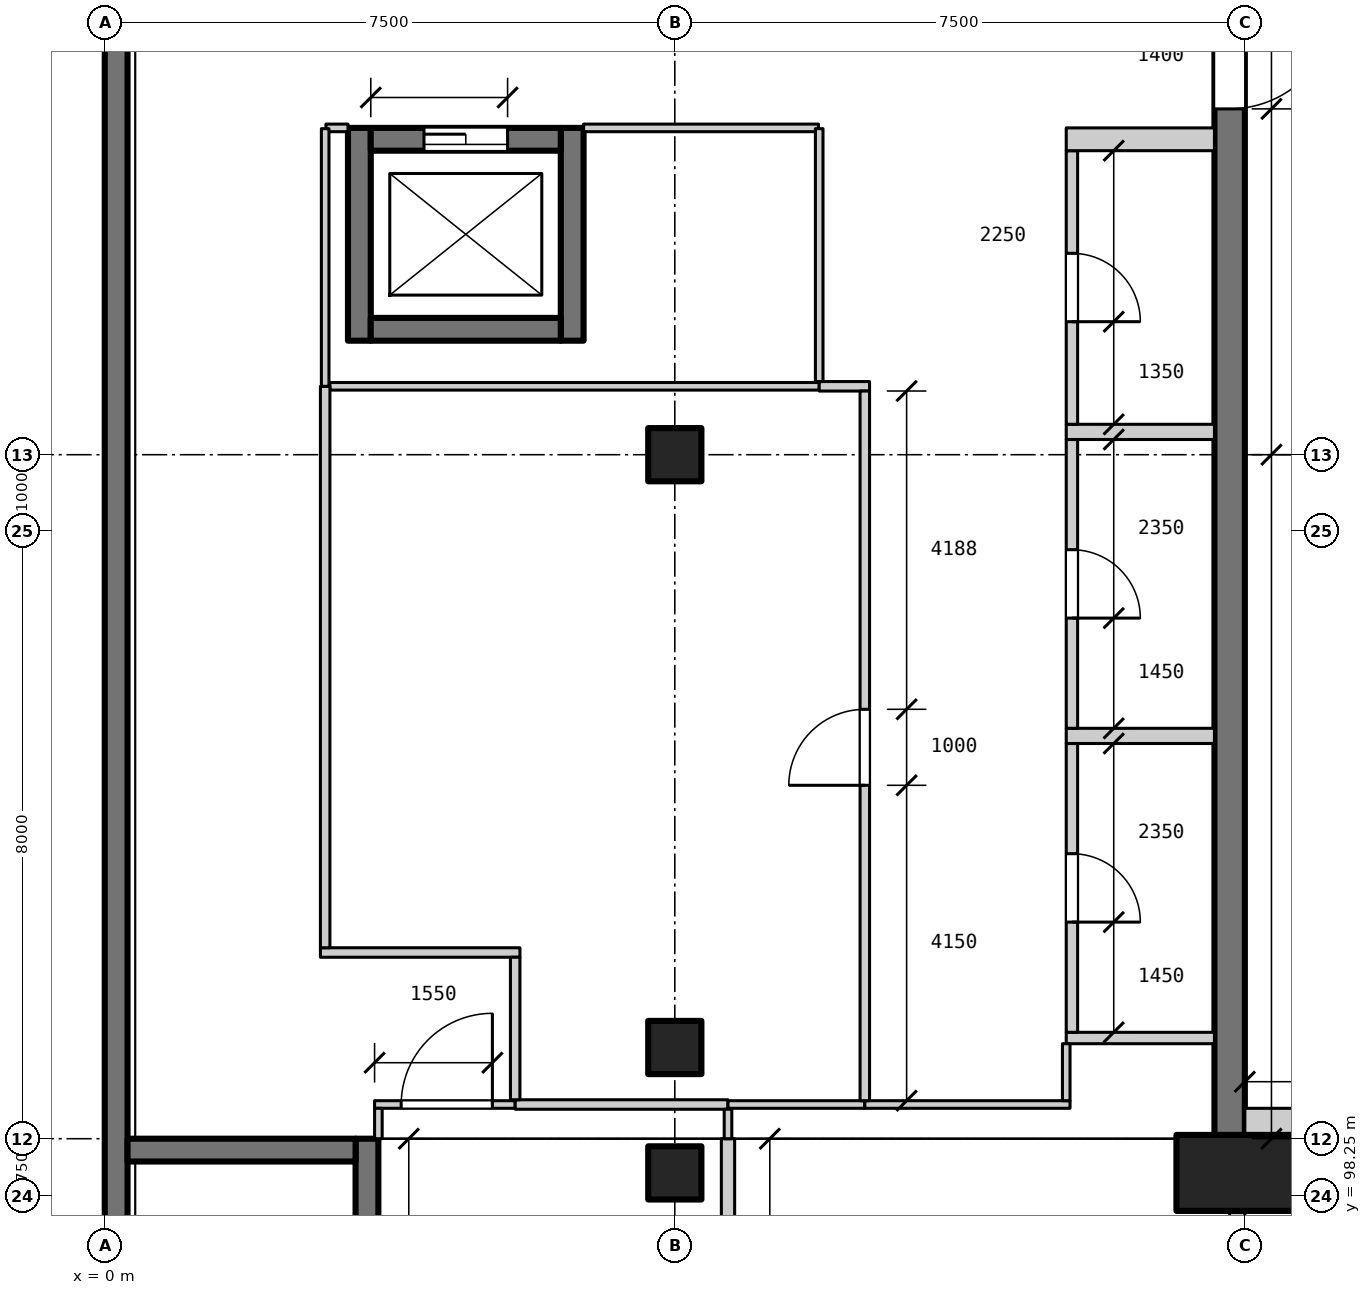
"""IFC4 building model, lengths in metres.
Left out: names, types, materials, properties, quantities, classifications, styles, units other than length and angle.
Written with IfcOpenShell. Run it as: python <this file> out.ifc"""

import sys

from ifc_helpers import new_model, si_unit, direction, frame, frame_2d, origin, origin_2d, place, context, subcontext, project, spatial, rectangle, extrude, element, fill, save


model = new_model("IFC4")
c1 = context("Model", 3, precision=1e-05, world=origin(), true_north=direction((0.0, 1.0)))
c2 = subcontext(c1, "Body", "Model", "MODEL_VIEW")
j1 = project(units=[si_unit("LENGTHUNIT", "METRE"), si_unit("PLANEANGLEUNIT", "RADIAN")], contexts=[c1])
p1 = place(None, origin())
s1 = spatial("IfcSite", under=j1, at=p1, CompositionType="ELEMENT")
p2 = place(p1, origin())
s2 = spatial("IfcBuilding", under=s1, at=p2, CompositionType="ELEMENT")
p3 = place(p2, origin())
s3 = spatial("IfcBuildingStorey", under=s2, at=p3, CompositionType="ELEMENT", Elevation=0.0)
for number, where, z_axis, x_axis in (
    (1, (7.5, 98.55, 0.0), (0.0, 0.0, 1.0), (1.0, 0.0, 0.0)),
    (2, (7.5, 100.2, 0.0), (0.0, 0.0, 1.0), (1.0, 0.0, 0.0)),
    (3, (7.5, 108.0, 0.0), (0.0, 0.0, 1.0), (1.0, 0.0, 0.0)),
):
    element("IfcColumn", number, at=place(p3, frame(where, z_axis=z_axis, x_axis=x_axis)), inside=s3, PredefinedType="COLUMN", context=c2, shape_type="SweptSolid", body=[
        extrude(rectangle(XDim=0.7, YDim=0.7, at=origin_2d()), origin(), (0.0, 0.0, 1.0), 6.0),
    ])
p4 = place(p3, frame((0.15, 18.0, 0.0), z_axis=(0.0, 0.0, 1.0), x_axis=(0.0, 1.0, 0.0)))
e4 = element("IfcWall", 4, at=p4, inside=s3, PredefinedType="SHEAR", context=c2, shape_type="SweptSolid", body=[
    extrude(rectangle(XDim=108.0, YDim=0.3, at=frame_2d((54.0, 0.0))), origin(), (0.0, 0.0, 1.0), 6.0),
])
p5 = place(p3, frame((14.8, 99.0, 0.0), z_axis=(0.0, 0.0, 1.0), x_axis=(0.0, 1.0, 0.0)))
e5 = element("IfcWall", 5, at=p5, inside=s3, PredefinedType="SHEAR", context=c2, shape_type="SweptSolid", body=[
    extrude(rectangle(XDim=26.55, YDim=0.4, at=frame_2d((13.275, 0.0))), origin(), (0.0, 0.0, 1.0), 6.0),
])
p6 = place(p5, frame((13.55, 0.0, 0.0)))
e6 = element("IfcOpeningElement", 6, at=p6, cuts=e5, PredefinedType="OPENING", context=c2, shape_type="SweptSolid", body=[
    extrude(rectangle(XDim=1.4, YDim=2.4, at=frame_2d((0.7, 1.2))), frame((0.0, 0.21, 0.0), z_axis=(0.0, -1.0, 0.0), x_axis=(1.0, 0.0, 0.0)), (0.0, 0.0, 1.0), 0.42),
])
p7 = place(p3, frame((3.45, 91.2, 0.0), z_axis=(0.0, 0.0, 1.0), x_axis=(0.0, 1.0, 0.0)))
e7 = element("IfcWall", 7, at=p7, inside=s3, PredefinedType="SHEAR", context=c2, shape_type="SweptSolid", body=[
    extrude(rectangle(XDim=7.8, YDim=0.3, at=frame_2d((3.9, 0.0))), origin(), (0.0, 0.0, 1.0), 6.0),
])
p8 = place(p7, frame((0.75, 0.0, 0.0)))
e8 = element("IfcOpeningElement", 8, at=p8, cuts=e7, PredefinedType="OPENING", context=c2, shape_type="SweptSolid", body=[
    extrude(rectangle(XDim=1.1, YDim=2.1, at=frame_2d((0.55, 1.05))), frame((0.0, 0.16, 0.0), z_axis=(0.0, -1.0, 0.0), x_axis=(1.0, 0.0, 0.0)), (0.0, 0.0, 1.0), 0.32),
])
p9 = place(p3, frame((0.3, 98.85, 0.0), z_axis=(0.0, 0.0, 1.0), x_axis=(1.0, 0.0, 0.0)))
e9 = element("IfcWall", 9, at=p9, inside=s3, PredefinedType="SHEAR", context=c2, shape_type="SweptSolid", body=[
    extrude(rectangle(XDim=3.0, YDim=0.3, at=frame_2d((1.5, 0.0))), origin(), (0.0, 0.0, 1.0), 6.0),
])
for number, where, z_axis, x_axis in (
    (10, (3.35, 109.5, 0.0), (0.0, 0.0, 1.0), (0.0, 1.0, 0.0)),
    (11, (6.15, 109.5, 0.0), (0.0, 0.0, 1.0), (0.0, 1.0, 0.0)),
):
    element("IfcWall", number, at=place(p3, frame(where, z_axis=z_axis, x_axis=x_axis)), inside=s3, PredefinedType="SHEAR", context=c2, shape_type="SweptSolid", body=[
        extrude(rectangle(XDim=2.8, YDim=0.3, at=frame_2d((1.4, 0.0))), origin(), (0.0, 0.0, 1.0), 6.0),
    ])
p10 = place(p3, frame((3.5, 109.65, 0.0), z_axis=(0.0, 0.0, 1.0), x_axis=(1.0, 0.0, 0.0)))
e12 = element("IfcWall", 12, at=p10, inside=s3, PredefinedType="SHEAR", context=c2, shape_type="SweptSolid", body=[
    extrude(rectangle(XDim=2.5, YDim=0.3, at=frame_2d((1.25, 0.0))), origin(), (0.0, 0.0, 1.0), 6.0),
])
p11 = place(p3, frame((3.5, 112.15, 0.0), z_axis=(0.0, 0.0, 1.0), x_axis=(1.0, 0.0, 0.0)))
e13 = element("IfcWall", 13, at=p11, inside=s3, PredefinedType="SHEAR", context=c2, shape_type="SweptSolid", body=[
    extrude(rectangle(XDim=2.5, YDim=0.3, at=frame_2d((1.25, 0.0))), origin(), (0.0, 0.0, 1.0), 6.0),
])
p12 = place(p11, frame((0.7, 0.0, 0.0)))
e14 = element("IfcOpeningElement", 14, at=p12, cuts=e13, PredefinedType="OPENING", context=c2, shape_type="SweptSolid", body=[
    extrude(rectangle(XDim=1.1, YDim=2.1, at=frame_2d((0.55, 1.05))), frame((0.0, 0.16, 0.0), z_axis=(0.0, -1.0, 0.0), x_axis=(1.0, 0.0, 0.0)), (0.0, 0.0, 1.0), 0.32),
])
p13 = place(p3, frame((15.0, 98.55, 0.0), z_axis=(0.0, 0.0, 1.0), x_axis=(1.0, 0.0, 0.0)))
e15 = element("IfcColumn", 15, at=p13, inside=s3, PredefinedType="COLUMN", context=c2, shape_type="SweptSolid", body=[
    extrude(rectangle(XDim=1.8, YDim=1.0, at=origin_2d()), origin(), (0.0, 0.0, 1.0), 6.0),
])
p14 = place(p3, frame((14.9, 98.05, 0.0), z_axis=(0.0, 0.0, 1.0), x_axis=(0.0, -1.0, 0.0)))
e16 = element("IfcWall", 16, at=p14, inside=s3, PredefinedType="PARTITIONING", context=c2, shape_type="SweptSolid", body=[
    extrude(rectangle(XDim=1.8, YDim=0.2, at=frame_2d((0.9, 0.0))), origin(), (0.0, 0.0, 1.0), 5.8),
])
p15 = place(p14, frame((0.4, 0.0, 0.0)))
e17 = element("IfcOpeningElement", 17, at=p15, cuts=e16, PredefinedType="OPENING", context=c2, shape_type="SweptSolid", body=[
    extrude(rectangle(XDim=1.0, YDim=2.4, at=frame_2d((0.5, 1.2))), frame((0.0, 0.11, 0.0), z_axis=(0.0, -1.0, 0.0), x_axis=(1.0, 0.0, 0.0)), (0.0, 0.0, 1.0), 0.22),
])
p16 = place(p3, frame((15.0, 99.2, 0.0), z_axis=(0.0, 0.0, 1.0), x_axis=(1.0, 0.0, 0.0)))
e18 = element("IfcWall", 18, at=p16, inside=s3, PredefinedType="PARTITIONING", context=c2, shape_type="SweptSolid", body=[
    extrude(rectangle(XDim=13.4, YDim=0.4, at=frame_2d((6.7, 0.0))), origin(), (0.0, 0.0, 1.0), 5.8),
])
p17 = place(p16, frame((1.8, 0.0, 0.0)))
e19 = element("IfcOpeningElement", 19, at=p17, cuts=e18, PredefinedType="OPENING", context=c2, shape_type="SweptSolid", body=[
    extrude(rectangle(XDim=2.4, YDim=2.4, at=frame_2d((1.2, 1.2))), frame((0.0, 0.21, 0.0), z_axis=(0.0, -1.0, 0.0), x_axis=(1.0, 0.0, 0.0)), (0.0, 0.0, 1.0), 0.42),
])
p18 = place(p3, frame((12.65, 100.325, 0.0), z_axis=(0.0, 0.0, 1.0), x_axis=(1.0, 0.0, 0.0)))
e20 = element("IfcWall", 20, at=p18, inside=s3, PredefinedType="PARTITIONING", context=c2, shape_type="SweptSolid", body=[
    extrude(rectangle(XDim=1.95, YDim=0.15, at=frame_2d((0.975, 0.0))), origin(), (0.0, 0.0, 1.0), 5.7),
])
p19 = place(p3, frame((12.725, 100.4, 0.0), z_axis=(0.0, 0.0, 1.0), x_axis=(0.0, 1.0, 0.0)))
e21 = element("IfcWall", 21, at=p19, inside=s3, PredefinedType="PARTITIONING", context=c2, shape_type="SweptSolid", body=[
    extrude(rectangle(XDim=3.8, YDim=0.15, at=frame_2d((1.9, 0.0))), origin(), (0.0, 0.0, 1.0), 5.7),
])
p20 = place(p19, frame((1.45, 0.0, 0.0)))
e22 = element("IfcOpeningElement", 22, at=p20, cuts=e21, PredefinedType="OPENING", context=c2, shape_type="SweptSolid", body=[
    extrude(rectangle(XDim=0.9, YDim=2.1, at=frame_2d((0.45, 1.05))), frame((0.0, 0.085, 0.0), z_axis=(0.0, -1.0, 0.0), x_axis=(1.0, 0.0, 0.0)), (0.0, 0.0, 1.0), 0.17),
])
p21 = place(p3, frame((12.65, 104.3, 0.0), z_axis=(0.0, 0.0, 1.0), x_axis=(1.0, 0.0, 0.0)))
e23 = element("IfcWall", 23, at=p21, inside=s3, PredefinedType="PARTITIONING", context=c2, shape_type="SweptSolid", body=[
    extrude(rectangle(XDim=1.95, YDim=0.2, at=frame_2d((0.975, 0.0))), origin(), (0.0, 0.0, 1.0), 5.7),
])
p22 = place(p3, frame((12.725, 104.4, 0.0), z_axis=(0.0, 0.0, 1.0), x_axis=(0.0, 1.0, 0.0)))
e24 = element("IfcWall", 24, at=p22, inside=s3, PredefinedType="PARTITIONING", context=c2, shape_type="SweptSolid", body=[
    extrude(rectangle(XDim=3.8, YDim=0.15, at=frame_2d((1.9, 0.0))), origin(), (0.0, 0.0, 1.0), 5.7),
])
p23 = place(p22, frame((1.45, 0.0, 0.0)))
e25 = element("IfcOpeningElement", 25, at=p23, cuts=e24, PredefinedType="OPENING", context=c2, shape_type="SweptSolid", body=[
    extrude(rectangle(XDim=0.9, YDim=2.1, at=frame_2d((0.45, 1.05))), frame((0.0, 0.085, 0.0), z_axis=(0.0, -1.0, 0.0), x_axis=(1.0, 0.0, 0.0)), (0.0, 0.0, 1.0), 0.17),
])
p24 = place(p3, frame((12.65, 108.3, 0.0), z_axis=(0.0, 0.0, 1.0), x_axis=(1.0, 0.0, 0.0)))
e26 = element("IfcWall", 26, at=p24, inside=s3, PredefinedType="PARTITIONING", context=c2, shape_type="SweptSolid", body=[
    extrude(rectangle(XDim=1.95, YDim=0.2, at=frame_2d((0.975, 0.0))), origin(), (0.0, 0.0, 1.0), 5.7),
])
p25 = place(p3, frame((12.725, 108.4, 0.0), z_axis=(0.0, 0.0, 1.0), x_axis=(0.0, 1.0, 0.0)))
e27 = element("IfcWall", 27, at=p25, inside=s3, PredefinedType="PARTITIONING", context=c2, shape_type="SweptSolid", body=[
    extrude(rectangle(XDim=3.6, YDim=0.15, at=frame_2d((1.8, 0.0))), origin(), (0.0, 0.0, 1.0), 5.7),
])
p26 = place(p25, frame((1.35, 0.0, 0.0)))
e28 = element("IfcOpeningElement", 28, at=p26, cuts=e27, PredefinedType="OPENING", context=c2, shape_type="SweptSolid", body=[
    extrude(rectangle(XDim=0.9, YDim=2.1, at=frame_2d((0.45, 1.05))), frame((0.0, 0.085, 0.0), z_axis=(0.0, -1.0, 0.0), x_axis=(1.0, 0.0, 0.0)), (0.0, 0.0, 1.0), 0.17),
])
p27 = place(p3, frame((12.65, 112.15, 0.0), z_axis=(0.0, 0.0, 1.0), x_axis=(1.0, 0.0, 0.0)))
e29 = element("IfcWall", 29, at=p27, inside=s3, PredefinedType="PARTITIONING", context=c2, shape_type="SweptSolid", body=[
    extrude(rectangle(XDim=1.95, YDim=0.3, at=frame_2d((0.975, 0.0))), origin(), (0.0, 0.0, 1.0), 5.7),
])
p28 = place(p3, frame((3.55, 99.45, 0.0), z_axis=(0.0, 0.0, 1.0), x_axis=(1.0, 0.0, 0.0)))
e30 = element("IfcWall", 30, at=p28, inside=s3, PredefinedType="PARTITIONING", context=c2, shape_type="SweptSolid", body=[
    extrude(rectangle(XDim=1.85, YDim=0.1, at=frame_2d((0.925, 0.0))), origin(), (0.0, 0.0, 1.0), 5.7),
])
p29 = place(p28, frame((0.35, 0.0, 0.0)))
e31 = element("IfcOpeningElement", 31, at=p29, cuts=e30, PredefinedType="OPENING", context=c2, shape_type="SweptSolid", body=[
    extrude(rectangle(XDim=1.2, YDim=2.1, at=frame_2d((0.6, 1.05))), frame((0.0, 0.06, 0.0), z_axis=(0.0, -1.0, 0.0), x_axis=(1.0, 0.0, 0.0)), (0.0, 0.0, 1.0), 0.12),
])
p30 = place(p3, frame((5.4, 99.45, 0.0), z_axis=(0.0, 0.0, 1.0), x_axis=(1.0, 0.0, 0.0)))
e32 = element("IfcWall", 32, at=p30, inside=s3, PredefinedType="PARTITIONING", context=c2, shape_type="SweptSolid", body=[
    extrude(rectangle(XDim=2.8, YDim=0.125, at=frame_2d((1.4, 0.0))), origin(), (0.0, 0.0, 1.0), 5.7),
])
p31 = place(p3, frame((8.2, 99.45, 0.0), z_axis=(0.0, 0.0, 1.0), x_axis=(1.0, 0.0, 0.0)))
e33 = element("IfcWall", 33, at=p31, inside=s3, PredefinedType="PARTITIONING", context=c2, shape_type="SweptSolid", body=[
    extrude(rectangle(XDim=1.8, YDim=0.1, at=frame_2d((0.9, 0.0))), origin(), (0.0, 0.0, 1.0), 5.7),
])
p32 = place(p3, frame((10.0, 99.45, 0.0), z_axis=(0.0, 0.0, 1.0), x_axis=(1.0, 0.0, 0.0)))
e34 = element("IfcWall", 34, at=p32, inside=s3, PredefinedType="PARTITIONING", context=c2, shape_type="SweptSolid", body=[
    extrude(rectangle(XDim=2.7, YDim=0.1, at=frame_2d((1.35, 0.0))), origin(), (0.0, 0.0, 1.0), 5.7),
])
p33 = place(p3, frame((2.837, 101.45, 0.0), z_axis=(0.0, 0.0, 1.0), x_axis=(1.0, 0.0, 0.0)))
e35 = element("IfcWall", 35, at=p33, inside=s3, PredefinedType="PARTITIONING", context=c2, shape_type="SweptSolid", body=[
    extrude(rectangle(XDim=2.625, YDim=0.125, at=frame_2d((1.312, 0.0))), origin(), (0.0, 0.0, 1.0), 5.7),
])
p34 = place(p3, frame((2.962, 108.9, 0.0), z_axis=(0.0, 0.0, 1.0), x_axis=(1.0, 0.0, 0.0)))
e36 = element("IfcWall", 36, at=p34, inside=s3, PredefinedType="PARTITIONING", context=c2, shape_type="SweptSolid", body=[
    extrude(rectangle(XDim=6.438, YDim=0.1, at=frame_2d((3.219, 0.0))), origin(), (0.0, 0.0, 1.0), 5.7),
])
p35 = place(p3, frame((9.4, 108.9, 0.0), z_axis=(0.0, 0.0, 1.0), x_axis=(1.0, 0.0, 0.0)))
e37 = element("IfcWall", 37, at=p35, inside=s3, PredefinedType="PARTITIONING", context=c2, shape_type="SweptSolid", body=[
    extrude(rectangle(XDim=0.663, YDim=0.125, at=frame_2d((0.331, 0.0))), origin(), (0.0, 0.0, 1.0), 5.7),
])
p36 = place(p3, frame((2.91, 112.3, 0.0), z_axis=(0.0, 0.0, 1.0), x_axis=(1.0, 0.0, 0.0)))
e38 = element("IfcWall", 38, at=p36, inside=s3, PredefinedType="PARTITIONING", context=c2, shape_type="SweptSolid", body=[
    extrude(rectangle(XDim=0.29, YDim=0.1, at=frame_2d((0.145, 0.0))), origin(), (0.0, 0.0, 1.0), 5.7),
])
p37 = place(p3, frame((6.3, 112.3, 0.0), z_axis=(0.0, 0.0, 1.0), x_axis=(1.0, 0.0, 0.0)))
e39 = element("IfcWall", 39, at=p37, inside=s3, PredefinedType="PARTITIONING", context=c2, shape_type="SweptSolid", body=[
    extrude(rectangle(XDim=3.09, YDim=0.1, at=frame_2d((1.545, 0.0))), origin(), (0.0, 0.0, 1.0), 5.7),
])
p38 = place(p3, frame((2.9, 101.512, 0.0), z_axis=(0.0, 0.0, 1.0), x_axis=(0.0, 1.0, 0.0)))
e40 = element("IfcWall", 40, at=p38, inside=s3, PredefinedType="PARTITIONING", context=c2, shape_type="SweptSolid", body=[
    extrude(rectangle(XDim=7.387, YDim=0.125, at=frame_2d((3.694, 0.0))), origin(), (0.0, 0.0, 1.0), 5.7),
])
p39 = place(p3, frame((2.9, 108.9, 0.0), z_axis=(0.0, 0.0, 1.0), x_axis=(0.0, 1.0, 0.0)))
e41 = element("IfcWall", 41, at=p39, inside=s3, PredefinedType="PARTITIONING", context=c2, shape_type="SweptSolid", body=[
    extrude(rectangle(XDim=3.39, YDim=0.1, at=frame_2d((1.695, 0.0))), origin(), (0.0, 0.0, 1.0), 5.7),
])
p40 = place(p3, frame((3.6, 99.0, 0.0), z_axis=(0.0, 0.0, 1.0), x_axis=(0.0, 1.0, 0.0)))
e42 = element("IfcWall", 42, at=p40, inside=s3, PredefinedType="PARTITIONING", context=c2, shape_type="SweptSolid", body=[
    extrude(rectangle(XDim=0.4, YDim=0.1, at=frame_2d((0.2, 0.0))), origin(), (0.0, 0.0, 1.0), 5.7),
])
p41 = place(p3, frame((5.4, 99.512, 0.0), z_axis=(0.0, 0.0, 1.0), x_axis=(0.0, 1.0, 0.0)))
e43 = element("IfcWall", 43, at=p41, inside=s3, PredefinedType="PARTITIONING", context=c2, shape_type="SweptSolid", body=[
    extrude(rectangle(XDim=1.875, YDim=0.125, at=frame_2d((0.938, 0.0))), origin(), (0.0, 0.0, 1.0), 5.7),
])
p42 = place(p3, frame((8.2, 91.2, 0.0), z_axis=(0.0, 0.0, 1.0), x_axis=(0.0, 1.0, 0.0)))
e44 = element("IfcWall", 44, at=p42, inside=s3, PredefinedType="PARTITIONING", context=c2, shape_type="SweptSolid", body=[
    extrude(rectangle(XDim=7.8, YDim=0.175, at=frame_2d((3.9, 0.0))), origin(), (0.0, 0.0, 1.0), 5.8),
])
p43 = place(p42, frame((1.65, 0.0, 0.0)))
e45 = element("IfcOpeningElement", 45, at=p43, cuts=e44, PredefinedType="OPENING", context=c2, shape_type="SweptSolid", body=[
    extrude(rectangle(XDim=1.8, YDim=2.1, at=frame_2d((0.9, 1.05))), frame((0.0, 0.097, 0.0), z_axis=(0.0, -1.0, 0.0), x_axis=(1.0, 0.0, 0.0)), (0.0, 0.0, 1.0), 0.195),
])
p44 = place(p3, frame((8.2, 99.0, 0.0), z_axis=(0.0, 0.0, 1.0), x_axis=(0.0, 1.0, 0.0)))
e46 = element("IfcWall", 46, at=p44, inside=s3, PredefinedType="PARTITIONING", context=c2, shape_type="SweptSolid", body=[
    extrude(rectangle(XDim=0.387, YDim=0.1, at=frame_2d((0.194, 0.0))), origin(), (0.0, 0.0, 1.0), 5.8),
])
p45 = place(p3, frame((9.4, 108.962, 0.0), z_axis=(0.0, 0.0, 1.0), x_axis=(0.0, 1.0, 0.0)))
e47 = element("IfcWall", 47, at=p45, inside=s3, PredefinedType="PARTITIONING", context=c2, shape_type="SweptSolid", body=[
    extrude(rectangle(XDim=3.328, YDim=0.1, at=frame_2d((1.664, 0.0))), origin(), (0.0, 0.0, 1.0), 5.7),
])
p46 = place(p3, frame((10.0, 99.5, 0.0), z_axis=(0.0, 0.0, 1.0), x_axis=(0.0, 1.0, 0.0)))
e48 = element("IfcWall", 48, at=p46, inside=s3, PredefinedType="PARTITIONING", context=c2, shape_type="SweptSolid", body=[
    extrude(rectangle(XDim=9.337, YDim=0.125, at=frame_2d((4.669, 0.0))), origin(), (0.0, 0.0, 1.0), 5.7),
])
p47 = place(p46, frame((4.15, 0.0, 0.0)))
e49 = element("IfcOpeningElement", 49, at=p47, cuts=e48, PredefinedType="OPENING", context=c2, shape_type="SweptSolid", body=[
    extrude(rectangle(XDim=1.0, YDim=2.1, at=frame_2d((0.5, 1.05))), frame((0.0, 0.073, 0.0), z_axis=(0.0, -1.0, 0.0), x_axis=(1.0, 0.0, 0.0)), (0.0, 0.0, 1.0), 0.145),
])
p48 = place(p3, frame((12.65, 99.5, 0.0), z_axis=(0.0, 0.0, 1.0), x_axis=(0.0, 1.0, 0.0)))
e50 = element("IfcWall", 50, at=p48, inside=s3, PredefinedType="PARTITIONING", context=c2, shape_type="SweptSolid", body=[
    extrude(rectangle(XDim=0.75, YDim=0.1, at=frame_2d((0.375, 0.0))), origin(), (0.0, 0.0, 1.0), 5.7),
])
p49 = place(p29, origin())
e51 = element("IfcDoor", 51, at=p49, inside=s3, OperationType="SINGLE_SWING_RIGHT", PredefinedType="DOOR", context=c2, shape_type="SweptSolid", body=[
    extrude(rectangle(XDim=1.2, YDim=2.1, at=frame_2d((0.6, 1.05))), frame((0.0, 0.025, 0.0), z_axis=(0.0, -1.0, 0.0), x_axis=(1.0, 0.0, 0.0)), (0.0, 0.0, 1.0), 0.05),
])
fill(e31, e51)
p50 = place(p20, frame((0.9, 0.0, 0.0), z_axis=(0.0, 0.0, 1.0), x_axis=(-1.0, 0.0, 0.0)))
e52 = element("IfcDoor", 52, at=p50, inside=s3, OperationType="SINGLE_SWING_RIGHT", PredefinedType="DOOR", context=c2, shape_type="SweptSolid", body=[
    extrude(rectangle(XDim=0.9, YDim=2.1, at=frame_2d((0.45, 1.05))), frame((0.0, 0.025, 0.0), z_axis=(0.0, -1.0, 0.0), x_axis=(1.0, 0.0, 0.0)), (0.0, 0.0, 1.0), 0.05),
])
fill(e22, e52)
p51 = place(p47, origin())
e53 = element("IfcDoor", 53, at=p51, inside=s3, OperationType="SINGLE_SWING_LEFT", PredefinedType="DOOR", context=c2, shape_type="SweptSolid", body=[
    extrude(rectangle(XDim=1.0, YDim=2.1, at=frame_2d((0.5, 1.05))), frame((0.0, 0.025, 0.0), z_axis=(0.0, -1.0, 0.0), x_axis=(1.0, 0.0, 0.0)), (0.0, 0.0, 1.0), 0.05),
])
fill(e49, e53)
p52 = place(p23, frame((0.9, 0.0, 0.0), z_axis=(0.0, 0.0, 1.0), x_axis=(-1.0, 0.0, 0.0)))
e54 = element("IfcDoor", 54, at=p52, inside=s3, OperationType="SINGLE_SWING_RIGHT", PredefinedType="DOOR", context=c2, shape_type="SweptSolid", body=[
    extrude(rectangle(XDim=0.9, YDim=2.1, at=frame_2d((0.45, 1.05))), frame((0.0, 0.025, 0.0), z_axis=(0.0, -1.0, 0.0), x_axis=(1.0, 0.0, 0.0)), (0.0, 0.0, 1.0), 0.05),
])
fill(e25, e54)
p53 = place(p26, frame((0.9, 0.0, 0.0), z_axis=(0.0, 0.0, 1.0), x_axis=(-1.0, 0.0, 0.0)))
e55 = element("IfcDoor", 55, at=p53, inside=s3, OperationType="SINGLE_SWING_RIGHT", PredefinedType="DOOR", context=c2, shape_type="SweptSolid", body=[
    extrude(rectangle(XDim=0.9, YDim=2.1, at=frame_2d((0.45, 1.05))), frame((0.0, 0.025, 0.0), z_axis=(0.0, -1.0, 0.0), x_axis=(1.0, 0.0, 0.0)), (0.0, 0.0, 1.0), 0.05),
])
fill(e28, e55)
p54 = place(p6, frame((1.4, 0.0, 0.0), z_axis=(0.0, 0.0, 1.0), x_axis=(-1.0, 0.0, 0.0)))
e56 = element("IfcDoor", 56, at=p54, inside=s3, OperationType="SINGLE_SWING_LEFT", PredefinedType="DOOR", context=c2, shape_type="SweptSolid", body=[
    extrude(rectangle(XDim=1.4, YDim=2.4, at=frame_2d((0.7, 1.2))), frame((0.0, 0.025, 0.0), z_axis=(0.0, -1.0, 0.0), x_axis=(1.0, 0.0, 0.0)), (0.0, 0.0, 1.0), 0.05),
])
fill(e6, e56)
p55 = place(p12, origin())
e57 = element("IfcDoor", 57, at=p55, inside=s3, OperationType="SLIDING_TO_LEFT", PredefinedType="DOOR", context=c2, shape_type="SweptSolid", body=[
    extrude(rectangle(XDim=1.1, YDim=2.1, at=frame_2d((0.55, 1.05))), frame((0.0, 0.025, 0.0), z_axis=(0.0, -1.0, 0.0), x_axis=(1.0, 0.0, 0.0)), (0.0, 0.0, 1.0), 0.05),
])
fill(e14, e57)
save(model, sys.argv[1])
